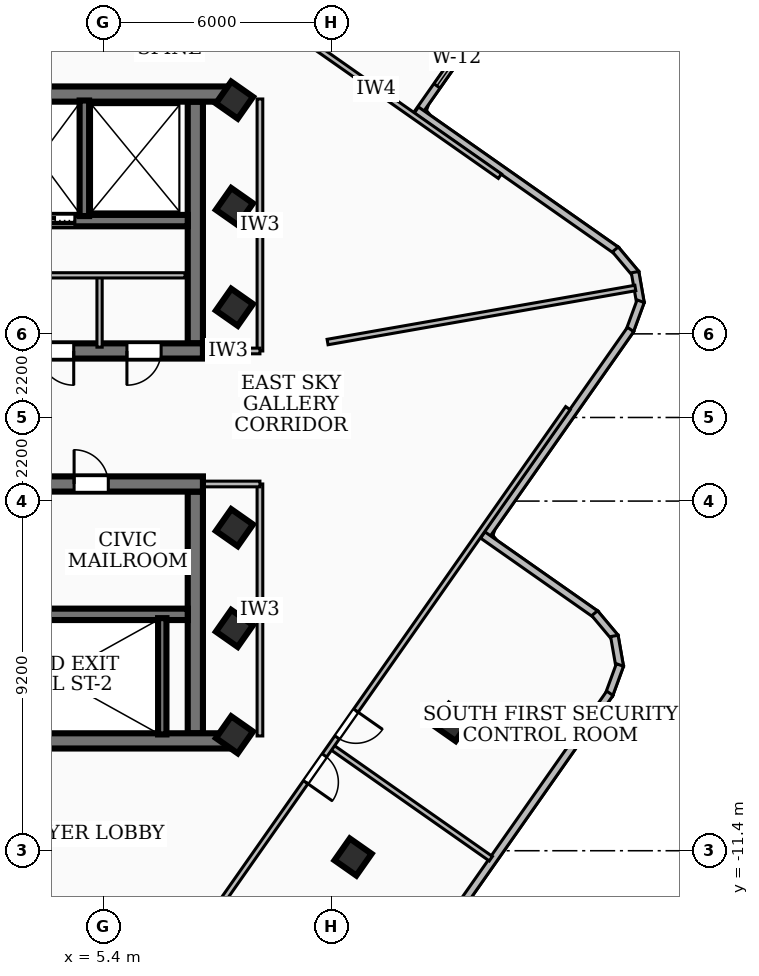
"""IFC4 building model, lengths in metres.
Left out: names, types, materials, properties, quantities, classifications, styles, units other than length and angle.
Written with IfcOpenShell. Run it as: python <this file> out.ifc"""

import sys

from ifc_helpers import new_model, si_unit, direction, frame, frame_2d, origin, origin_2d, place, context, subcontext, project, spatial, rectangle, extrude, element, fill, save


model = new_model("IFC4")
c1 = context("Model", 3, precision=1e-05, world=origin(), true_north=direction((0.0, 1.0)))
c2 = subcontext(c1, "Body", "Model", "MODEL_VIEW")
j1 = project(units=[si_unit("LENGTHUNIT", "METRE"), si_unit("PLANEANGLEUNIT", "RADIAN")], contexts=[c1])
p1 = place(None, origin())
s1 = spatial("IfcSite", under=j1, at=p1, CompositionType="ELEMENT")
p2 = place(p1, origin())
s2 = spatial("IfcBuilding", under=s1, at=p2, CompositionType="ELEMENT")
p3 = place(p2, frame((0.0, 0.0, 264.6)))
s3 = spatial("IfcBuildingStorey", under=s2, at=p3, CompositionType="ELEMENT", Elevation=264.6)
p4 = place(p3, frame((-8.78, 8.51, 0.0), z_axis=(0.0, 0.0, 1.0), x_axis=(1.0, 0.0, 0.0)))
e1 = element("IfcWall", 1, at=p4, inside=s3, PredefinedType="SHEAR", context=c2, shape_type="SweptSolid", body=[
    extrude(rectangle(XDim=17.56, YDim=0.4, at=frame_2d((8.78, 0.0))), origin(), (0.0, 0.0, 1.0), 3.16),
])
p5 = place(p3, frame((8.02, 1.75, 0.0), z_axis=(0.0, 0.0, 1.0), x_axis=(-1.0, 0.0, 0.0)))
e2 = element("IfcWall", 2, at=p5, inside=s3, PredefinedType="SHEAR", context=c2, shape_type="SweptSolid", body=[
    extrude(rectangle(XDim=16.04, YDim=0.4, at=frame_2d((8.02, 0.0))), origin(), (0.0, 0.0, 1.0), 3.16),
])
p6 = place(p5, frame((7.45, 0.0, 0.0)))
e3 = element("IfcOpeningElement", 3, at=p6, cuts=e2, PredefinedType="OPENING", context=c2, shape_type="SweptSolid", body=[
    extrude(rectangle(XDim=1.0, YDim=2.1, at=frame_2d((0.5, 1.05))), frame((0.0, 0.21, 0.0), z_axis=(0.0, -1.0, 0.0), x_axis=(1.0, 0.0, 0.0)), (0.0, 0.0, 1.0), 0.42),
])
p7 = place(p5, frame((14.285, 0.0, 0.0)))
e4 = element("IfcOpeningElement", 4, at=p7, cuts=e2, PredefinedType="OPENING", context=c2, shape_type="SweptSolid", body=[
    extrude(rectangle(XDim=1.05, YDim=2.15, at=frame_2d((0.525, 1.075))), frame((0.0, 0.21, 0.0), z_axis=(0.0, -1.0, 0.0), x_axis=(1.0, 0.0, 0.0)), (0.0, 0.0, 1.0), 0.42),
])
p8 = place(p5, frame((12.725, 0.0, 0.0)))
e5 = element("IfcOpeningElement", 5, at=p8, cuts=e2, PredefinedType="OPENING", context=c2, shape_type="SweptSolid", body=[
    extrude(rectangle(XDim=1.05, YDim=2.15, at=frame_2d((0.525, 1.075))), frame((0.0, 0.21, 0.0), z_axis=(0.0, -1.0, 0.0), x_axis=(1.0, 0.0, 0.0)), (0.0, 0.0, 1.0), 0.42),
])
p9 = place(p5, frame((11.165, 0.0, 0.0)))
e6 = element("IfcOpeningElement", 6, at=p9, cuts=e2, PredefinedType="OPENING", context=c2, shape_type="SweptSolid", body=[
    extrude(rectangle(XDim=1.05, YDim=2.15, at=frame_2d((0.525, 1.075))), frame((0.0, 0.21, 0.0), z_axis=(0.0, -1.0, 0.0), x_axis=(1.0, 0.0, 0.0)), (0.0, 0.0, 1.0), 0.42),
])
p10 = place(p5, frame((3.4, 0.0, 0.0)))
e7 = element("IfcOpeningElement", 7, at=p10, cuts=e2, PredefinedType="OPENING", context=c2, shape_type="SweptSolid", body=[
    extrude(rectangle(XDim=0.9, YDim=2.06, at=frame_2d((0.45, 1.03))), frame((0.0, 0.21, 0.0), z_axis=(0.0, -1.0, 0.0), x_axis=(1.0, 0.0, 0.0)), (0.0, 0.0, 1.0), 0.42),
])
p11 = place(p5, frame((1.1, 0.0, 0.0)))
e8 = element("IfcOpeningElement", 8, at=p11, cuts=e2, PredefinedType="OPENING", context=c2, shape_type="SweptSolid", body=[
    extrude(rectangle(XDim=0.9, YDim=2.06, at=frame_2d((0.45, 1.03))), frame((0.0, 0.21, 0.0), z_axis=(0.0, -1.0, 0.0), x_axis=(1.0, 0.0, 0.0)), (0.0, 0.0, 1.0), 0.42),
])
p12 = place(p3, frame((7.82, 8.31, 0.0), z_axis=(0.0, 0.0, 1.0), x_axis=(0.0, -1.0, 0.0)))
e9 = element("IfcWall", 9, at=p12, inside=s3, PredefinedType="SHEAR", context=c2, shape_type="SweptSolid", body=[
    extrude(rectangle(XDim=6.36, YDim=0.4, at=frame_2d((3.18, 0.0))), origin(), (0.0, 0.0, 1.0), 3.16),
])
p13 = place(p3, frame((7.62, 5.18, 0.0), z_axis=(0.0, 0.0, 1.0), x_axis=(-1.0, 0.0, 0.0)))
e10 = element("IfcWall", 10, at=p13, inside=s3, PredefinedType="SOLIDWALL", context=c2, shape_type="SweptSolid", body=[
    extrude(rectangle(XDim=15.24, YDim=0.3, at=frame_2d((7.62, 0.0))), origin(), (0.0, 0.0, 1.0), 3.16),
])
p14 = place(p13, frame((5.77, 0.0, 0.0)))
e11 = element("IfcOpeningElement", 11, at=p14, cuts=e10, PredefinedType="OPENING", context=c2, shape_type="SweptSolid", body=[
    extrude(rectangle(XDim=1.1, YDim=2.15, at=frame_2d((0.55, 1.075))), frame((0.0, 0.16, 0.0), z_axis=(0.0, -1.0, 0.0), x_axis=(1.0, 0.0, 0.0)), (0.0, 0.0, 1.0), 0.32),
])
p15 = place(p13, frame((2.97, 0.0, 0.0)))
e12 = element("IfcOpeningElement", 12, at=p15, cuts=e10, PredefinedType="OPENING", context=c2, shape_type="SweptSolid", body=[
    extrude(rectangle(XDim=1.1, YDim=2.15, at=frame_2d((0.55, 1.075))), frame((0.0, 0.16, 0.0), z_axis=(0.0, -1.0, 0.0), x_axis=(1.0, 0.0, 0.0)), (0.0, 0.0, 1.0), 0.32),
])
p16 = place(p13, frame((7.97, 0.0, 0.0)))
e13 = element("IfcOpeningElement", 13, at=p16, cuts=e10, PredefinedType="OPENING", context=c2, shape_type="SweptSolid", body=[
    extrude(rectangle(XDim=1.0, YDim=2.1, at=frame_2d((0.5, 1.05))), frame((0.0, 0.16, 0.0), z_axis=(0.0, -1.0, 0.0), x_axis=(1.0, 0.0, 0.0)), (0.0, 0.0, 1.0), 0.32),
])
p17 = place(p3, frame((8.78, -8.51, 0.0), z_axis=(0.0, 0.0, 1.0), x_axis=(-1.0, 0.0, 0.0)))
e14 = element("IfcWall", 14, at=p17, inside=s3, PredefinedType="SHEAR", context=c2, shape_type="SweptSolid", body=[
    extrude(rectangle(XDim=17.56, YDim=0.4, at=frame_2d((8.78, 0.0))), origin(), (0.0, 0.0, 1.0), 3.16),
])
p18 = place(p3, frame((-8.02, -1.75, 0.0), z_axis=(0.0, 0.0, 1.0), x_axis=(1.0, 0.0, 0.0)))
e15 = element("IfcWall", 15, at=p18, inside=s3, PredefinedType="SHEAR", context=c2, shape_type="SweptSolid", body=[
    extrude(rectangle(XDim=16.04, YDim=0.4, at=frame_2d((8.02, 0.0))), origin(), (0.0, 0.0, 1.0), 3.16),
])
p19 = place(p18, frame((7.45, 0.0, 0.0)))
e16 = element("IfcOpeningElement", 16, at=p19, cuts=e15, PredefinedType="OPENING", context=c2, shape_type="SweptSolid", body=[
    extrude(rectangle(XDim=1.0, YDim=2.1, at=frame_2d((0.5, 1.05))), frame((0.0, 0.21, 0.0), z_axis=(0.0, -1.0, 0.0), x_axis=(1.0, 0.0, 0.0)), (0.0, 0.0, 1.0), 0.42),
])
p20 = place(p18, frame((12.65, 0.0, 0.0)))
e17 = element("IfcOpeningElement", 17, at=p20, cuts=e15, PredefinedType="OPENING", context=c2, shape_type="SweptSolid", body=[
    extrude(rectangle(XDim=0.9, YDim=2.06, at=frame_2d((0.45, 1.03))), frame((0.0, 0.21, 0.0), z_axis=(0.0, -1.0, 0.0), x_axis=(1.0, 0.0, 0.0)), (0.0, 0.0, 1.0), 0.42),
])
p21 = place(p18, frame((2.25, 0.0, 0.0)))
e18 = element("IfcOpeningElement", 18, at=p21, cuts=e15, PredefinedType="OPENING", context=c2, shape_type="SweptSolid", body=[
    extrude(rectangle(XDim=0.9, YDim=2.06, at=frame_2d((0.45, 1.03))), frame((0.0, 0.21, 0.0), z_axis=(0.0, -1.0, 0.0), x_axis=(1.0, 0.0, 0.0)), (0.0, 0.0, 1.0), 0.42),
])
p22 = place(p3, frame((7.82, -1.95, 0.0), z_axis=(0.0, 0.0, 1.0), x_axis=(0.0, -1.0, 0.0)))
e19 = element("IfcWall", 19, at=p22, inside=s3, PredefinedType="SHEAR", context=c2, shape_type="SweptSolid", body=[
    extrude(rectangle(XDim=6.36, YDim=0.4, at=frame_2d((3.18, 0.0))), origin(), (0.0, 0.0, 1.0), 3.16),
])
p23 = place(p3, frame((-7.62, -5.18, 0.0), z_axis=(0.0, 0.0, 1.0), x_axis=(1.0, 0.0, 0.0)))
e20 = element("IfcWall", 20, at=p23, inside=s3, PredefinedType="SOLIDWALL", context=c2, shape_type="SweptSolid", body=[
    extrude(rectangle(XDim=15.24, YDim=0.3, at=frame_2d((7.62, 0.0))), origin(), (0.0, 0.0, 1.0), 3.16),
])
p24 = place(p23, frame((5.77, 0.0, 0.0)))
e21 = element("IfcOpeningElement", 21, at=p24, cuts=e20, PredefinedType="OPENING", context=c2, shape_type="SweptSolid", body=[
    extrude(rectangle(XDim=1.1, YDim=2.15, at=frame_2d((0.55, 1.075))), frame((0.0, 0.16, 0.0), z_axis=(0.0, -1.0, 0.0), x_axis=(1.0, 0.0, 0.0)), (0.0, 0.0, 1.0), 0.32),
])
p25 = place(p23, frame((7.97, 0.0, 0.0)))
e22 = element("IfcOpeningElement", 22, at=p25, cuts=e20, PredefinedType="OPENING", context=c2, shape_type="SweptSolid", body=[
    extrude(rectangle(XDim=1.0, YDim=2.1, at=frame_2d((0.5, 1.05))), frame((0.0, 0.16, 0.0), z_axis=(0.0, -1.0, 0.0), x_axis=(1.0, 0.0, 0.0)), (0.0, 0.0, 1.0), 0.32),
])
p26 = place(p3, frame((6.95, -8.34, 0.0), z_axis=(0.0, 0.0, 1.0), x_axis=(0.0, 1.0, 0.0)))
e23 = element("IfcWall", 23, at=p26, inside=s3, PredefinedType="SOLIDWALL", context=c2, shape_type="SweptSolid", body=[
    extrude(rectangle(XDim=3.06, YDim=0.22, at=frame_2d((1.53, 0.0))), origin(), (0.0, 0.0, 1.0), 3.16),
])
p27 = place(p3, frame((4.9, 5.3, 0.0), z_axis=(0.0, 0.0, 1.0), x_axis=(0.0, 1.0, 0.0)))
e24 = element("IfcWall", 24, at=p27, inside=s3, PredefinedType="SOLIDWALL", context=c2, shape_type="SweptSolid", body=[
    extrude(rectangle(XDim=3.04, YDim=0.25, at=frame_2d((1.52, 0.0))), origin(), (0.0, 0.0, 1.0), 3.16),
])
for number, where, z_axis, x_axis in (
    (25, (8.85, -5.55, 0.0), (0.0, 0.0, 1.0), (0.574, 0.819, 0.0)),
    (26, (8.85, -2.9, 0.0), (0.0, 0.0, 1.0), (0.574, 0.819, 0.0)),
    (27, (8.85, 2.9, 0.0), (0.0, 0.0, 1.0), (0.574, 0.819, 0.0)),
    (28, (8.85, 5.55, 0.0), (0.0, 0.0, 1.0), (0.574, 0.819, 0.0)),
    (29, (8.85, -8.35, 0.0), (0.0, 0.0, 1.0), (0.574, 0.819, 0.0)),
    (30, (8.85, 8.35, 0.0), (0.0, 0.0, 1.0), (0.574, 0.819, 0.0)),
    (31, (11.971, -11.566, 0.0), (0.0, 0.0, 1.0), (0.574, 0.819, 0.0)),
    (32, (14.583, -8.026, 0.0), (0.0, 0.0, 1.0), (0.574, 0.819, 0.0)),
):
    element("IfcColumn", number, at=place(p3, frame(where, z_axis=z_axis, x_axis=x_axis)), inside=s3, PredefinedType="COLUMN", context=c2, shape_type="SweptSolid", body=[
        extrude(rectangle(XDim=0.7, YDim=0.7, at=origin_2d()), origin(), (0.0, 0.0, 1.0), 3.42),
    ])
p28 = place(p3, frame((18.386, 14.724, 0.0), z_axis=(0.0, 0.0, 1.0), x_axis=(-0.574193796103, -0.818719417454, 0.0)))
e33 = element("IfcWall", 33, at=p28, inside=s3, PredefinedType="SOLIDWALL", context=c2, shape_type="SweptSolid", body=[
    extrude(rectangle(XDim=8.241, YDim=0.2, at=frame_2d((4.121, 0.0))), origin(), (0.0, 0.0, 1.0), 3.16),
])
p29 = place(p28, frame((5.528, 0.0, 0.85)))
e34 = element("IfcOpeningElement", 34, at=p29, cuts=e33, PredefinedType="OPENING", context=c2, shape_type="SweptSolid", body=[
    extrude(rectangle(XDim=1.8, YDim=1.6, at=frame_2d((0.9, 0.8))), frame((0.0, 0.11, 0.0), z_axis=(0.0, -1.0, 0.0), x_axis=(1.0, 0.0, 0.0)), (0.0, 0.0, 1.0), 0.22),
])
p30 = place(p3, frame((13.635, 8.088, 0.0), z_axis=(0.0, 0.0, 1.0), x_axis=(0.818654548261, -0.574286279317, 0.0)))
e35 = element("IfcWall", 35, at=p30, inside=s3, PredefinedType="SOLIDWALL", context=c2, shape_type="SweptSolid", body=[
    extrude(rectangle(XDim=6.441, YDim=0.2, at=frame_2d((3.22, 0.0))), origin(), (0.0, 0.0, 1.0), 3.16),
])
p31 = place(p3, frame((18.872, 4.422, 0.0), z_axis=(0.0, 0.0, 1.0), x_axis=(0.642816318642, -0.766020352528, 0.0)))
e36 = element("IfcWall", 36, at=p31, inside=s3, PredefinedType="SOLIDWALL", context=c2, shape_type="SweptSolid", body=[
    extrude(rectangle(XDim=0.838, YDim=0.2, at=frame_2d((0.419, 0.0))), origin(), (0.0, 0.0, 1.0), 3.16),
])
p32 = place(p3, frame((19.391, 3.824, 0.0), z_axis=(0.0, 0.0, 1.0), x_axis=(0.171877988141, -0.985118245285, 0.0)))
e37 = element("IfcWall", 37, at=p32, inside=s3, PredefinedType="SOLIDWALL", context=c2, shape_type="SweptSolid", body=[
    extrude(rectangle(XDim=0.825, YDim=0.2, at=frame_2d((0.413, 0.0))), origin(), (0.0, 0.0, 1.0), 3.16),
])
p33 = place(p3, frame((19.538, 3.059, 0.0), z_axis=(0.0, 0.0, 1.0), x_axis=(-0.344083284363, -0.938939131905, 0.0)))
e38 = element("IfcWall", 38, at=p33, inside=s3, PredefinedType="SOLIDWALL", context=c2, shape_type="SweptSolid", body=[
    extrude(rectangle(XDim=0.837, YDim=0.2, at=frame_2d((0.418, 0.0))), origin(), (0.0, 0.0, 1.0), 3.16),
])
p34 = place(p3, frame((19.273, 2.316, 0.0), z_axis=(0.0, 0.0, 1.0), x_axis=(-0.574227764949, -0.818695592978, 0.0)))
e39 = element("IfcWall", 39, at=p34, inside=s3, PredefinedType="SOLIDWALL", context=c2, shape_type="SweptSolid", body=[
    extrude(rectangle(XDim=6.741, YDim=0.2, at=frame_2d((3.371, 0.0))), origin(), (0.0, 0.0, 1.0), 3.16),
])
p35 = place(p3, frame((15.383, -3.092, 0.0), z_axis=(0.0, 0.0, 1.0), x_axis=(0.818664531158, -0.574272048269, 0.0)))
e40 = element("IfcWall", 40, at=p35, inside=s3, PredefinedType="SOLIDWALL", context=c2, shape_type="SweptSolid", body=[
    extrude(rectangle(XDim=3.641, YDim=0.2, at=frame_2d((1.821, 0.0))), origin(), (0.0, 0.0, 1.0), 3.16),
])
p36 = place(p3, frame((18.328, -5.15, 0.0), z_axis=(0.0, 0.0, 1.0), x_axis=(0.642303159159, -0.766450684477, 0.0)))
e41 = element("IfcWall", 41, at=p36, inside=s3, PredefinedType="SOLIDWALL", context=c2, shape_type="SweptSolid", body=[
    extrude(rectangle(XDim=0.838, YDim=0.2, at=frame_2d((0.419, 0.0))), origin(), (0.0, 0.0, 1.0), 3.16),
])
p37 = place(p3, frame((18.846, -5.748, 0.0), z_axis=(0.0, 0.0, 1.0), x_axis=(0.172165058078, -0.985068115806, 0.0)))
e42 = element("IfcWall", 42, at=p37, inside=s3, PredefinedType="SOLIDWALL", context=c2, shape_type="SweptSolid", body=[
    extrude(rectangle(XDim=0.825, YDim=0.2, at=frame_2d((0.413, 0.0))), origin(), (0.0, 0.0, 1.0), 3.16),
])
p38 = place(p3, frame((18.993, -6.513, 0.0), z_axis=(0.0, 0.0, 1.0), x_axis=(-0.343449935769, -0.93917098636, 0.0)))
e43 = element("IfcWall", 43, at=p38, inside=s3, PredefinedType="SOLIDWALL", context=c2, shape_type="SweptSolid", body=[
    extrude(rectangle(XDim=0.838, YDim=0.2, at=frame_2d((0.419, 0.0))), origin(), (0.0, 0.0, 1.0), 3.16),
])
p39 = place(p3, frame((18.728, -7.257, 0.0), z_axis=(0.0, 0.0, 1.0), x_axis=(-0.574152395536, -0.818748451419, 0.0)))
e44 = element("IfcWall", 44, at=p39, inside=s3, PredefinedType="SOLIDWALL", context=c2, shape_type="SweptSolid", body=[
    extrude(rectangle(XDim=9.923, YDim=0.2, at=frame_2d((4.961, 0.0))), origin(), (0.0, 0.0, 1.0), 3.16),
])
p40 = place(p39, frame((6.84, 0.0, 0.85)))
e45 = element("IfcOpeningElement", 45, at=p40, cuts=e44, PredefinedType="OPENING", context=c2, shape_type="SweptSolid", body=[
    extrude(rectangle(XDim=1.8, YDim=1.6, at=frame_2d((0.9, 0.8))), frame((0.0, 0.11, 0.0), z_axis=(0.0, -1.0, 0.0), x_axis=(1.0, 0.0, 0.0)), (0.0, 0.0, 1.0), 0.22),
])
p41 = place(p3, frame((2.9, 3.74, 0.0), z_axis=(0.0, 0.0, 1.0), x_axis=(1.0, 0.0, 0.0)))
e46 = element("IfcWall", 46, at=p41, inside=s3, PredefinedType="PARTITIONING", context=c2, shape_type="SweptSolid", body=[
    extrude(rectangle(XDim=4.65, YDim=0.138, at=frame_2d((2.325, 0.0))), origin(), (0.0, 0.0, 1.0), 3.16),
])
p42 = place(p3, frame((5.3, 1.85, 0.0), z_axis=(0.0, 0.0, 1.0), x_axis=(0.0, 1.0, 0.0)))
e47 = element("IfcWall", 47, at=p42, inside=s3, PredefinedType="PARTITIONING", context=c2, shape_type="SweptSolid", body=[
    extrude(rectangle(XDim=1.89, YDim=0.138, at=frame_2d((0.945, 0.0))), origin(), (0.0, 0.0, 1.0), 2.39),
])
p43 = place(p3, frame((9.52, 1.75, 0.0), z_axis=(0.0, 0.0, 1.0), x_axis=(0.0, 1.0, 0.0)))
e48 = element("IfcWall", 48, at=p43, inside=s3, PredefinedType="PARTITIONING", context=c2, shape_type="SweptSolid", body=[
    extrude(rectangle(XDim=6.63, YDim=0.15, at=frame_2d((3.315, 0.0))), origin(), (0.0, 0.0, 1.0), 3.16),
])
p44 = place(p3, frame((7.85, 1.75, 0.0), z_axis=(0.0, 0.0, 1.0), x_axis=(1.0, 0.0, 0.0)))
e49 = element("IfcWall", 49, at=p44, inside=s3, PredefinedType="PARTITIONING", context=c2, shape_type="SweptSolid", body=[
    extrude(rectangle(XDim=1.67, YDim=0.15, at=frame_2d((0.835, 0.0))), origin(), (0.0, 0.0, 1.0), 2.39),
])
p45 = place(p3, frame((9.52, -8.38, 0.0), z_axis=(0.0, 0.0, 1.0), x_axis=(0.0, 1.0, 0.0)))
e50 = element("IfcWall", 50, at=p45, inside=s3, PredefinedType="PARTITIONING", context=c2, shape_type="SweptSolid", body=[
    extrude(rectangle(XDim=6.63, YDim=0.15, at=frame_2d((3.315, 0.0))), origin(), (0.0, 0.0, 1.0), 2.53),
])
p46 = place(p3, frame((7.85, -1.75, 0.0), z_axis=(0.0, 0.0, 1.0), x_axis=(1.0, 0.0, 0.0)))
e51 = element("IfcWall", 51, at=p46, inside=s3, PredefinedType="PARTITIONING", context=c2, shape_type="SweptSolid", body=[
    extrude(rectangle(XDim=1.67, YDim=0.15, at=frame_2d((0.835, 0.0))), origin(), (0.0, 0.0, 1.0), 2.39),
])
p47 = place(p3, frame((11.3, 1.985, 0.0), z_axis=(0.0, 0.0, 1.0), x_axis=(0.984932365377, 0.172939976965, 0.0)))
e52 = element("IfcWall", 52, at=p47, inside=s3, PredefinedType="PARTITIONING", context=c2, shape_type="SweptSolid", body=[
    extrude(rectangle(XDim=8.222, YDim=0.145, at=frame_2d((4.111, 0.0))), origin(), (0.0, 0.0, 1.0), 3.16),
])
p48 = place(p3, frame((15.835, 6.349, 0.0), z_axis=(0.0, 0.0, 1.0), x_axis=(-0.818780073776, 0.57410729902, 0.0)))
e53 = element("IfcWall", 53, at=p48, inside=s3, PredefinedType="PARTITIONING", context=c2, shape_type="SweptSolid", body=[
    extrude(rectangle(XDim=7.95, YDim=0.145, at=frame_2d((3.975, 0.0))), origin(), (0.0, 0.0, 1.0), 2.53),
])
p49 = place(p3, frame((11.433, -8.689, 0.0), z_axis=(0.0, 0.0, 1.0), x_axis=(0.81868341552, -0.574245126363, 0.0)))
e54 = element("IfcWall", 54, at=p49, inside=s3, PredefinedType="PARTITIONING", context=c2, shape_type="SweptSolid", body=[
    extrude(rectangle(XDim=5.085, YDim=0.145, at=frame_2d((2.542, 0.0))), origin(), (0.0, 0.0, 1.0), 3.16),
])
p50 = place(p3, frame((17.625, 0.245, 0.0), z_axis=(0.0, 0.0, 1.0), x_axis=(-0.574126736534, -0.818766444352, 0.0)))
e55 = element("IfcWall", 55, at=p50, inside=s3, PredefinedType="PARTITIONING", context=c2, shape_type="SweptSolid", body=[
    extrude(rectangle(XDim=20.34, YDim=0.145, at=frame_2d((10.17, 0.0))), origin(), (0.0, 0.0, 1.0), 2.53),
])
p51 = place(p50, frame((11.16, 0.0, 0.0)))
e56 = element("IfcOpeningElement", 56, at=p51, cuts=e55, PredefinedType="OPENING", context=c2, shape_type="SweptSolid", body=[
    extrude(rectangle(XDim=0.86, YDim=2.04, at=frame_2d((0.43, 1.02))), frame((0.0, 0.083, 0.0), z_axis=(0.0, -1.0, 0.0), x_axis=(1.0, 0.0, 0.0)), (0.0, 0.0, 1.0), 0.165),
])
p52 = place(p50, frame((9.72, 0.0, 0.0)))
e57 = element("IfcOpeningElement", 57, at=p52, cuts=e55, PredefinedType="OPENING", context=c2, shape_type="SweptSolid", body=[
    extrude(rectangle(XDim=0.86, YDim=2.04, at=frame_2d((0.43, 1.02))), frame((0.0, 0.083, 0.0), z_axis=(0.0, -1.0, 0.0), x_axis=(1.0, 0.0, 0.0)), (0.0, 0.0, 1.0), 0.165),
])
p53 = place(p29, origin())
e58 = element("IfcWindow", 58, at=p53, inside=s3, PartitioningType="SINGLE_PANEL", PredefinedType="WINDOW", context=c2, shape_type="SweptSolid", body=[
    extrude(rectangle(XDim=1.8, YDim=1.6, at=frame_2d((0.9, 0.8))), frame((0.0, 0.03, 0.0), z_axis=(0.0, -1.0, 0.0), x_axis=(1.0, 0.0, 0.0)), (0.0, 0.0, 1.0), 0.06),
])
fill(e34, e58)
p54 = place(p15, origin())
e59 = element("IfcDoor", 59, at=p54, inside=s3, OperationType="DOUBLE_DOOR_SLIDING", PredefinedType="DOOR", context=c2, shape_type="SweptSolid", body=[
    extrude(rectangle(XDim=1.1, YDim=2.15, at=frame_2d((0.55, 1.075))), frame((0.0, 0.025, 0.0), z_axis=(0.0, -1.0, 0.0), x_axis=(1.0, 0.0, 0.0)), (0.0, 0.0, 1.0), 0.05),
])
fill(e12, e59)
p55 = place(p20, origin())
e60 = element("IfcDoor", 60, at=p55, inside=s3, OperationType="SINGLE_SWING_LEFT", PredefinedType="DOOR", context=c2, shape_type="SweptSolid", body=[
    extrude(rectangle(XDim=0.9, YDim=2.06, at=frame_2d((0.45, 1.03))), frame((0.0, 0.025, 0.0), z_axis=(0.0, -1.0, 0.0), x_axis=(1.0, 0.0, 0.0)), (0.0, 0.0, 1.0), 0.05),
])
fill(e17, e60)
p56 = place(p10, origin())
e61 = element("IfcDoor", 61, at=p56, inside=s3, OperationType="SINGLE_SWING_LEFT", PredefinedType="DOOR", context=c2, shape_type="SweptSolid", body=[
    extrude(rectangle(XDim=0.9, YDim=2.06, at=frame_2d((0.45, 1.03))), frame((0.0, 0.025, 0.0), z_axis=(0.0, -1.0, 0.0), x_axis=(1.0, 0.0, 0.0)), (0.0, 0.0, 1.0), 0.05),
])
fill(e7, e61)
p57 = place(p11, origin())
e62 = element("IfcDoor", 62, at=p57, inside=s3, OperationType="SINGLE_SWING_RIGHT", PredefinedType="DOOR", context=c2, shape_type="SweptSolid", body=[
    extrude(rectangle(XDim=0.9, YDim=2.06, at=frame_2d((0.45, 1.03))), frame((0.0, 0.025, 0.0), z_axis=(0.0, -1.0, 0.0), x_axis=(1.0, 0.0, 0.0)), (0.0, 0.0, 1.0), 0.05),
])
fill(e8, e62)
p58 = place(p51, origin())
e63 = element("IfcDoor", 63, at=p58, inside=s3, OperationType="SINGLE_SWING_RIGHT", PredefinedType="DOOR", context=c2, shape_type="SweptSolid", body=[
    extrude(rectangle(XDim=0.86, YDim=2.04, at=frame_2d((0.43, 1.02))), frame((0.0, 0.025, 0.0), z_axis=(0.0, -1.0, 0.0), x_axis=(1.0, 0.0, 0.0)), (0.0, 0.0, 1.0), 0.05),
])
fill(e56, e63)
p59 = place(p52, origin())
e64 = element("IfcDoor", 64, at=p59, inside=s3, OperationType="SINGLE_SWING_LEFT", PredefinedType="DOOR", context=c2, shape_type="SweptSolid", body=[
    extrude(rectangle(XDim=0.86, YDim=2.04, at=frame_2d((0.43, 1.02))), frame((0.0, 0.025, 0.0), z_axis=(0.0, -1.0, 0.0), x_axis=(1.0, 0.0, 0.0)), (0.0, 0.0, 1.0), 0.05),
])
fill(e57, e64)
save(model, sys.argv[1])
